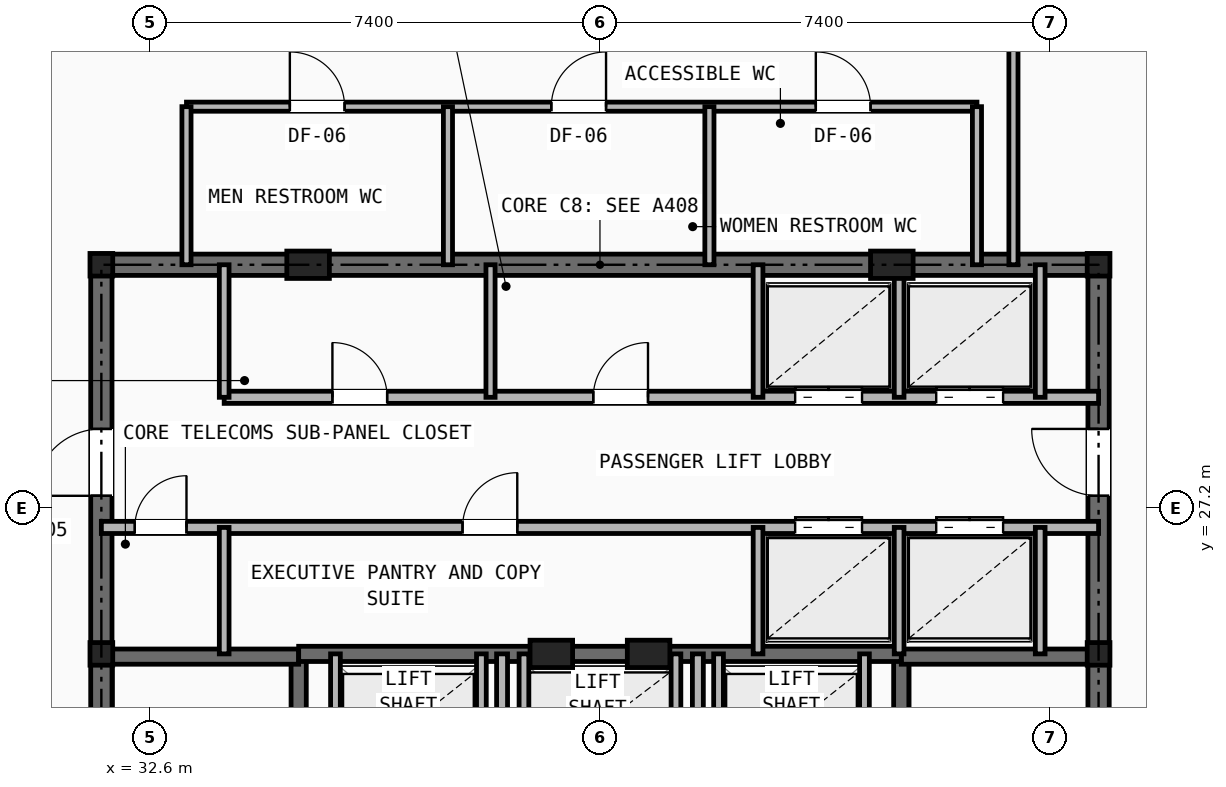
"""IFC4 building model, lengths in metres.
Left out: names, types, materials, properties, quantities, classifications, styles, units other than length and angle.
Written with IfcOpenShell. Run it as: python <this file> out.ifc"""

import sys

from ifc_helpers import new_model, si_unit, direction, frame, frame_2d, origin, origin_2d, place, context, subcontext, project, spatial, rectangle, i_section, extrude, element, fill, save


model = new_model("IFC4")
c1 = context("Model", 3, precision=1e-05, world=origin(), true_north=direction((0.0, 1.0)))
c2 = subcontext(c1, "Body", "Model", "MODEL_VIEW")
j1 = project(units=[si_unit("LENGTHUNIT", "METRE"), si_unit("PLANEANGLEUNIT", "RADIAN")], contexts=[c1])
p1 = place(None, origin())
s1 = spatial("IfcSite", under=j1, at=p1, CompositionType="ELEMENT")
p2 = place(p1, origin())
s2 = spatial("IfcBuilding", under=s1, at=p2, CompositionType="ELEMENT")
p3 = place(p2, frame((0.0, 0.0, 286.5)))
s3 = spatial("IfcBuildingStorey", under=s2, at=p3, CompositionType="ELEMENT", Elevation=286.5)
for number, where, z_axis, x_axis in (
    (1, (31.8, 24.8, 0.0), (0.0, 0.0, 1.0), (1.0, 0.0, 0.0)),
    (2, (48.2, 24.8, 0.0), (0.0, 0.0, 1.0), (1.0, 0.0, 0.0)),
    (3, (31.8, 31.2, 0.0), (0.0, 0.0, 1.0), (1.0, 0.0, 0.0)),
    (4, (48.2, 31.2, 0.0), (0.0, 0.0, 1.0), (1.0, 0.0, 0.0)),
):
    element("IfcColumn", number, at=place(p3, frame(where, z_axis=z_axis, x_axis=x_axis)), inside=s3, PredefinedType="COLUMN", context=c2, shape_type="SweptSolid", body=[
        extrude(i_section(OverallWidth=0.374, OverallDepth=0.372, WebThickness=0.016, FlangeThickness=0.026, at=origin_2d()), origin(), (0.0, 0.0, 1.0), 3.5),
    ])
for number, where, z_axis, x_axis in (
    (5, (35.2, 31.2, 0.0), (0.0, 0.0, 1.0), (1.0, 0.0, 0.0)),
    (6, (44.8, 31.2, 0.0), (0.0, 0.0, 1.0), (1.0, 0.0, 0.0)),
    (7, (39.2, 24.8, 0.0), (0.0, 0.0, 1.0), (1.0, 0.0, 0.0)),
    (8, (40.8, 24.8, 0.0), (0.0, 0.0, 1.0), (1.0, 0.0, 0.0)),
):
    element("IfcColumn", number, at=place(p3, frame(where, z_axis=z_axis, x_axis=x_axis)), inside=s3, PredefinedType="PILASTER", context=c2, shape_type="SweptSolid", body=[
        extrude(rectangle(XDim=0.7, YDim=0.45, at=origin_2d()), origin(), (0.0, 0.0, 1.0), 3.5),
    ])
p4 = place(p3, frame((31.8, 31.2, 0.0), z_axis=(0.0, 0.0, 1.0), x_axis=(1.0, 0.0, 0.0)))
e9 = element("IfcWall", 9, at=p4, inside=s3, PredefinedType="SHEAR", context=c2, shape_type="SweptSolid", body=[
    extrude(rectangle(XDim=16.4, YDim=0.35, at=frame_2d((8.2, 0.0))), origin(), (0.0, 0.0, 1.0), 3.2),
])
p5 = place(p3, frame((31.8, 16.4, 0.0), z_axis=(0.0, 0.0, 1.0), x_axis=(0.0, 1.0, 0.0)))
e10 = element("IfcWall", 10, at=p5, inside=s3, PredefinedType="SHEAR", context=c2, shape_type="SweptSolid", body=[
    extrude(rectangle(XDim=14.8, YDim=0.35, at=frame_2d((7.4, 0.0))), origin(), (0.0, 0.0, 1.0), 3.2),
])
p6 = place(p5, frame((11.0, 0.0, 0.0)))
e11 = element("IfcOpeningElement", 11, at=p6, cuts=e10, PredefinedType="OPENING", context=c2, shape_type="SweptSolid", body=[
    extrude(rectangle(XDim=1.1, YDim=2.15, at=frame_2d((0.55, 1.075))), frame((0.0, 0.185, 0.0), z_axis=(0.0, -1.0, 0.0), x_axis=(1.0, 0.0, 0.0)), (0.0, 0.0, 1.0), 0.37),
])
p7 = place(p3, frame((48.2, 16.4, 0.0), z_axis=(0.0, 0.0, 1.0), x_axis=(0.0, 1.0, 0.0)))
e12 = element("IfcWall", 12, at=p7, inside=s3, PredefinedType="SHEAR", context=c2, shape_type="SweptSolid", body=[
    extrude(rectangle(XDim=14.8, YDim=0.35, at=frame_2d((7.4, 0.0))), origin(), (0.0, 0.0, 1.0), 3.2),
])
p8 = place(p7, frame((11.0, 0.0, 0.0)))
e13 = element("IfcOpeningElement", 13, at=p8, cuts=e12, PredefinedType="OPENING", context=c2, shape_type="SweptSolid", body=[
    extrude(rectangle(XDim=1.1, YDim=2.15, at=frame_2d((0.55, 1.075))), frame((0.0, 0.185, 0.0), z_axis=(0.0, -1.0, 0.0), x_axis=(1.0, 0.0, 0.0)), (0.0, 0.0, 1.0), 0.37),
])
p9 = place(p3, frame((35.045, 16.4, 0.0), z_axis=(0.0, 0.0, 1.0), x_axis=(0.0, 1.0, 0.0)))
e14 = element("IfcWall", 14, at=p9, inside=s3, PredefinedType="SHEAR", context=c2, shape_type="SweptSolid", body=[
    extrude(rectangle(XDim=8.4, YDim=0.25, at=frame_2d((4.2, 0.0))), origin(), (0.0, 0.0, 1.0), 3.2),
])
p10 = place(p9, frame((0.45, 0.0, 0.0)))
e15 = element("IfcOpeningElement", 15, at=p10, cuts=e14, PredefinedType="OPENING", context=c2, shape_type="SweptSolid", body=[
    extrude(rectangle(XDim=0.95, YDim=2.1, at=frame_2d((0.475, 1.05))), frame((0.0, 0.135, 0.0), z_axis=(0.0, -1.0, 0.0), x_axis=(1.0, 0.0, 0.0)), (0.0, 0.0, 1.0), 0.27),
])
p11 = place(p3, frame((31.8, 24.755, 0.0), z_axis=(0.0, 0.0, 1.0), x_axis=(1.0, 0.0, 0.0)))
e16 = element("IfcWall", 16, at=p11, inside=s3, PredefinedType="SHEAR", context=c2, shape_type="SweptSolid", body=[
    extrude(rectangle(XDim=3.245, YDim=0.25, at=frame_2d((1.623, 0.0))), origin(), (0.0, 0.0, 1.0), 3.2),
])
p12 = place(p3, frame((44.955, 16.4, 0.0), z_axis=(0.0, 0.0, 1.0), x_axis=(0.0, 1.0, 0.0)))
e17 = element("IfcWall", 17, at=p12, inside=s3, PredefinedType="SHEAR", context=c2, shape_type="SweptSolid", body=[
    extrude(rectangle(XDim=8.4, YDim=0.25, at=frame_2d((4.2, 0.0))), origin(), (0.0, 0.0, 1.0), 3.2),
])
p13 = place(p12, frame((0.45, 0.0, 0.0)))
e18 = element("IfcOpeningElement", 18, at=p13, cuts=e17, PredefinedType="OPENING", context=c2, shape_type="SweptSolid", body=[
    extrude(rectangle(XDim=0.95, YDim=2.1, at=frame_2d((0.475, 1.05))), frame((0.0, 0.135, 0.0), z_axis=(0.0, -1.0, 0.0), x_axis=(1.0, 0.0, 0.0)), (0.0, 0.0, 1.0), 0.27),
])
p14 = place(p3, frame((44.955, 24.755, 0.0), z_axis=(0.0, 0.0, 1.0), x_axis=(1.0, 0.0, 0.0)))
e19 = element("IfcWall", 19, at=p14, inside=s3, PredefinedType="SHEAR", context=c2, shape_type="SweptSolid", body=[
    extrude(rectangle(XDim=3.245, YDim=0.25, at=frame_2d((1.623, 0.0))), origin(), (0.0, 0.0, 1.0), 3.2),
])
p15 = place(p3, frame((35.045, 24.8, 0.0), z_axis=(0.0, 0.0, 1.0), x_axis=(1.0, 0.0, 0.0)))
e20 = element("IfcWall", 20, at=p15, inside=s3, PredefinedType="SHEAR", context=c2, shape_type="SweptSolid", body=[
    extrude(rectangle(XDim=9.91, YDim=0.25, at=frame_2d((4.955, 0.0))), origin(), (0.0, 0.0, 1.0), 3.2),
])
p16 = place(p3, frame((38.39, 16.4, 0.0), z_axis=(0.0, 0.0, 1.0), x_axis=(0.0, 1.0, 0.0)))
e21 = element("IfcWall", 21, at=p16, inside=s3, PredefinedType="PARTITIONING", context=c2, shape_type="SweptSolid", body=[
    extrude(rectangle(XDim=8.4, YDim=0.18, at=frame_2d((4.2, 0.0))), origin(), (0.0, 0.0, 1.0), 2.655),
])
p17 = place(p16, frame((3.85, 0.0, 0.0)))
e22 = element("IfcOpeningElement", 22, at=p17, cuts=e21, PredefinedType="OPENING", context=c2, shape_type="SweptSolid", body=[
    extrude(rectangle(XDim=0.95, YDim=2.1, at=frame_2d((0.475, 1.05))), frame((0.0, 0.1, 0.0), z_axis=(0.0, -1.0, 0.0), x_axis=(1.0, 0.0, 0.0)), (0.0, 0.0, 1.0), 0.2),
])
p18 = place(p3, frame((41.61, 16.4, 0.0), z_axis=(0.0, 0.0, 1.0), x_axis=(0.0, 1.0, 0.0)))
e23 = element("IfcWall", 23, at=p18, inside=s3, PredefinedType="PARTITIONING", context=c2, shape_type="SweptSolid", body=[
    extrude(rectangle(XDim=8.4, YDim=0.18, at=frame_2d((4.2, 0.0))), origin(), (0.0, 0.0, 1.0), 2.655),
])
for number, where, z_axis, x_axis in (
    (24, (35.65, 22.48, 0.0), (0.0, 0.0, 1.0), (0.0, 1.0, 0.0)),
    (25, (38.05, 22.48, 0.0), (0.0, 0.0, 1.0), (0.0, 1.0, 0.0)),
    (26, (41.95, 22.48, 0.0), (0.0, 0.0, 1.0), (0.0, 1.0, 0.0)),
    (27, (44.35, 22.48, 0.0), (0.0, 0.0, 1.0), (0.0, 1.0, 0.0)),
    (28, (38.75, 22.48, 0.0), (0.0, 0.0, 1.0), (0.0, 1.0, 0.0)),
    (29, (41.25, 22.48, 0.0), (0.0, 0.0, 1.0), (0.0, 1.0, 0.0)),
):
    element("IfcWall", number, at=place(p3, frame(where, z_axis=z_axis, x_axis=x_axis)), inside=s3, PredefinedType="SOLIDWALL", context=c2, shape_type="SweptSolid", body=[
        extrude(rectangle(XDim=2.32, YDim=0.16, at=frame_2d((1.16, 0.0))), origin(), (0.0, 0.0, 1.0), 3.2),
    ])
p19 = place(p3, frame((33.82, 29.02, 0.0), z_axis=(0.0, 0.0, 1.0), x_axis=(1.0, 0.0, 0.0)))
e30 = element("IfcWall", 30, at=p19, inside=s3, PredefinedType="SOLIDWALL", context=c2, shape_type="SweptSolid", body=[
    extrude(rectangle(XDim=14.38, YDim=0.2, at=frame_2d((7.19, 0.0))), origin(), (0.0, 0.0, 1.0), 2.655),
])
p20 = place(p19, frame((1.78, 0.0, 0.0)))
e31 = element("IfcOpeningElement", 31, at=p20, cuts=e30, PredefinedType="OPENING", context=c2, shape_type="SweptSolid", body=[
    extrude(rectangle(XDim=0.9, YDim=2.1, at=frame_2d((0.45, 1.05))), frame((0.0, 0.11, 0.0), z_axis=(0.0, -1.0, 0.0), x_axis=(1.0, 0.0, 0.0)), (0.0, 0.0, 1.0), 0.22),
])
p21 = place(p19, frame((6.07, 0.0, 0.0)))
e32 = element("IfcOpeningElement", 32, at=p21, cuts=e30, PredefinedType="OPENING", context=c2, shape_type="SweptSolid", body=[
    extrude(rectangle(XDim=0.9, YDim=2.1, at=frame_2d((0.45, 1.05))), frame((0.0, 0.11, 0.0), z_axis=(0.0, -1.0, 0.0), x_axis=(1.0, 0.0, 0.0)), (0.0, 0.0, 1.0), 0.22),
])
p22 = place(p19, frame((9.39, 0.0, 0.0)))
e33 = element("IfcOpeningElement", 33, at=p22, cuts=e30, PredefinedType="OPENING", context=c2, shape_type="SweptSolid", body=[
    extrude(rectangle(XDim=1.1, YDim=2.15, at=frame_2d((0.55, 1.075))), frame((0.0, 0.11, 0.0), z_axis=(0.0, -1.0, 0.0), x_axis=(1.0, 0.0, 0.0)), (0.0, 0.0, 1.0), 0.22),
])
p23 = place(p19, frame((11.71, 0.0, 0.0)))
e34 = element("IfcOpeningElement", 34, at=p23, cuts=e30, PredefinedType="OPENING", context=c2, shape_type="SweptSolid", body=[
    extrude(rectangle(XDim=1.1, YDim=2.15, at=frame_2d((0.55, 1.075))), frame((0.0, 0.11, 0.0), z_axis=(0.0, -1.0, 0.0), x_axis=(1.0, 0.0, 0.0)), (0.0, 0.0, 1.0), 0.22),
])
p24 = place(p3, frame((31.8, 26.88, 0.0), z_axis=(0.0, 0.0, 1.0), x_axis=(1.0, 0.0, 0.0)))
e35 = element("IfcWall", 35, at=p24, inside=s3, PredefinedType="SOLIDWALL", context=c2, shape_type="SweptSolid", body=[
    extrude(rectangle(XDim=16.4, YDim=0.2, at=frame_2d((8.2, 0.0))), origin(), (0.0, 0.0, 1.0), 2.655),
])
p25 = place(p24, frame((0.55, 0.0, 0.0)))
e36 = element("IfcOpeningElement", 36, at=p25, cuts=e35, PredefinedType="OPENING", context=c2, shape_type="SweptSolid", body=[
    extrude(rectangle(XDim=0.85, YDim=2.05, at=frame_2d((0.425, 1.025))), frame((0.0, 0.11, 0.0), z_axis=(0.0, -1.0, 0.0), x_axis=(1.0, 0.0, 0.0)), (0.0, 0.0, 1.0), 0.22),
])
p26 = place(p24, frame((5.94, 0.0, 0.0)))
e37 = element("IfcOpeningElement", 37, at=p26, cuts=e35, PredefinedType="OPENING", context=c2, shape_type="SweptSolid", body=[
    extrude(rectangle(XDim=0.9, YDim=2.1, at=frame_2d((0.45, 1.05))), frame((0.0, 0.11, 0.0), z_axis=(0.0, -1.0, 0.0), x_axis=(1.0, 0.0, 0.0)), (0.0, 0.0, 1.0), 0.22),
])
p27 = place(p24, frame((11.41, 0.0, 0.0)))
e38 = element("IfcOpeningElement", 38, at=p27, cuts=e35, PredefinedType="OPENING", context=c2, shape_type="SweptSolid", body=[
    extrude(rectangle(XDim=1.1, YDim=2.15, at=frame_2d((0.55, 1.075))), frame((0.0, 0.11, 0.0), z_axis=(0.0, -1.0, 0.0), x_axis=(1.0, 0.0, 0.0)), (0.0, 0.0, 1.0), 0.22),
])
p28 = place(p24, frame((13.73, 0.0, 0.0)))
e39 = element("IfcOpeningElement", 39, at=p28, cuts=e35, PredefinedType="OPENING", context=c2, shape_type="SweptSolid", body=[
    extrude(rectangle(XDim=1.1, YDim=2.15, at=frame_2d((0.55, 1.075))), frame((0.0, 0.11, 0.0), z_axis=(0.0, -1.0, 0.0), x_axis=(1.0, 0.0, 0.0)), (0.0, 0.0, 1.0), 0.22),
])
p29 = place(p3, frame((33.82, 29.02, 0.0), z_axis=(0.0, 0.0, 1.0), x_axis=(0.0, 1.0, 0.0)))
e40 = element("IfcWall", 40, at=p29, inside=s3, PredefinedType="SOLIDWALL", context=c2, shape_type="SweptSolid", body=[
    extrude(rectangle(XDim=2.18, YDim=0.16, at=frame_2d((1.09, 0.0))), origin(), (0.0, 0.0, 1.0), 2.655),
])
p30 = place(p3, frame((33.82, 24.8, 0.0), z_axis=(0.0, 0.0, 1.0), x_axis=(0.0, 1.0, 0.0)))
e41 = element("IfcWall", 41, at=p30, inside=s3, PredefinedType="SOLIDWALL", context=c2, shape_type="SweptSolid", body=[
    extrude(rectangle(XDim=2.08, YDim=0.16, at=frame_2d((1.04, 0.0))), origin(), (0.0, 0.0, 1.0), 3.2),
])
p31 = place(p3, frame((38.2, 29.02, 0.0), z_axis=(0.0, 0.0, 1.0), x_axis=(0.0, 1.0, 0.0)))
e42 = element("IfcWall", 42, at=p31, inside=s3, PredefinedType="PARTITIONING", context=c2, shape_type="SweptSolid", body=[
    extrude(rectangle(XDim=2.18, YDim=0.15, at=frame_2d((1.09, 0.0))), origin(), (0.0, 0.0, 1.0), 2.655),
])
for number, where, z_axis, x_axis in (
    (43, (42.6, 29.02, 0.0), (0.0, 0.0, 1.0), (0.0, 1.0, 0.0)),
    (44, (44.92, 29.02, 0.0), (0.0, 0.0, 1.0), (0.0, 1.0, 0.0)),
    (45, (47.24, 29.02, 0.0), (0.0, 0.0, 1.0), (0.0, 1.0, 0.0)),
):
    element("IfcWall", number, at=place(p3, frame(where, z_axis=z_axis, x_axis=x_axis)), inside=s3, PredefinedType="SOLIDWALL", context=c2, shape_type="SweptSolid", body=[
        extrude(rectangle(XDim=2.18, YDim=0.16, at=frame_2d((1.09, 0.0))), origin(), (0.0, 0.0, 1.0), 2.655),
    ])
for number, where, z_axis, x_axis in (
    (46, (42.6, 24.8, 0.0), (0.0, 0.0, 1.0), (0.0, 1.0, 0.0)),
    (47, (44.92, 24.8, 0.0), (0.0, 0.0, 1.0), (0.0, 1.0, 0.0)),
    (48, (47.24, 24.8, 0.0), (0.0, 0.0, 1.0), (0.0, 1.0, 0.0)),
):
    element("IfcWall", number, at=place(p3, frame(where, z_axis=z_axis, x_axis=x_axis)), inside=s3, PredefinedType="SOLIDWALL", context=c2, shape_type="SweptSolid", body=[
        extrude(rectangle(XDim=2.08, YDim=0.16, at=frame_2d((1.04, 0.0))), origin(), (0.0, 0.0, 1.0), 3.2),
    ])
p32 = place(p3, frame((33.2, 33.8, 0.0), z_axis=(0.0, 0.0, 1.0), x_axis=(1.0, 0.0, 0.0)))
e49 = element("IfcWall", 49, at=p32, inside=s3, PredefinedType="PARTITIONING", context=c2, shape_type="SweptSolid", body=[
    extrude(rectangle(XDim=13.0, YDim=0.15, at=frame_2d((6.5, 0.0))), origin(), (0.0, 0.0, 1.0), 3.2),
])
p33 = place(p32, frame((1.7, 0.0, 0.0)))
e50 = element("IfcOpeningElement", 50, at=p33, cuts=e49, PredefinedType="OPENING", context=c2, shape_type="SweptSolid", body=[
    extrude(rectangle(XDim=0.9, YDim=2.1, at=frame_2d((0.45, 1.05))), frame((0.0, 0.085, 0.0), z_axis=(0.0, -1.0, 0.0), x_axis=(1.0, 0.0, 0.0)), (0.0, 0.0, 1.0), 0.17),
])
p34 = place(p32, frame((6.0, 0.0, 0.0)))
e51 = element("IfcOpeningElement", 51, at=p34, cuts=e49, PredefinedType="OPENING", context=c2, shape_type="SweptSolid", body=[
    extrude(rectangle(XDim=0.9, YDim=2.1, at=frame_2d((0.45, 1.05))), frame((0.0, 0.085, 0.0), z_axis=(0.0, -1.0, 0.0), x_axis=(1.0, 0.0, 0.0)), (0.0, 0.0, 1.0), 0.17),
])
p35 = place(p32, frame((10.35, 0.0, 0.0)))
e52 = element("IfcOpeningElement", 52, at=p35, cuts=e49, PredefinedType="OPENING", context=c2, shape_type="SweptSolid", body=[
    extrude(rectangle(XDim=0.9, YDim=2.1, at=frame_2d((0.45, 1.05))), frame((0.0, 0.085, 0.0), z_axis=(0.0, -1.0, 0.0), x_axis=(1.0, 0.0, 0.0)), (0.0, 0.0, 1.0), 0.17),
])
for number, where, z_axis, x_axis in (
    (53, (33.2, 31.2, 0.0), (0.0, 0.0, 1.0), (0.0, 1.0, 0.0)),
    (54, (46.2, 31.2, 0.0), (0.0, 0.0, 1.0), (0.0, 1.0, 0.0)),
    (55, (37.5, 31.2, 0.0), (0.0, 0.0, 1.0), (0.0, 1.0, 0.0)),
    (56, (41.8, 31.2, 0.0), (0.0, 0.0, 1.0), (0.0, 1.0, 0.0)),
):
    element("IfcWall", number, at=place(p3, frame(where, z_axis=z_axis, x_axis=x_axis)), inside=s3, PredefinedType="PARTITIONING", context=c2, shape_type="SweptSolid", body=[
        extrude(rectangle(XDim=2.6, YDim=0.15, at=frame_2d((1.3, 0.0))), origin(), (0.0, 0.0, 1.0), 2.655),
    ])
p36 = place(p3, frame((46.8, 31.2, 0.0), z_axis=(0.0, 0.0, 1.0), x_axis=(0.0, 1.0, 0.0)))
e57 = element("IfcWall", 57, at=p36, inside=s3, PredefinedType="PARTITIONING", context=c2, shape_type="SweptSolid", body=[
    extrude(rectangle(XDim=4.5, YDim=0.15, at=frame_2d((2.25, 0.0))), origin(), (0.0, 0.0, 1.0), 2.655),
])
p37 = place(p25, origin())
e58 = element("IfcDoor", 58, at=p37, inside=s3, OperationType="SINGLE_SWING_RIGHT", PredefinedType="DOOR", context=c2, shape_type="SweptSolid", body=[
    extrude(rectangle(XDim=0.85, YDim=2.05, at=frame_2d((0.425, 1.025))), frame((0.0, 0.025, 0.0), z_axis=(0.0, -1.0, 0.0), x_axis=(1.0, 0.0, 0.0)), (0.0, 0.0, 1.0), 0.05),
])
fill(e36, e58)
p38 = place(p6, origin())
e59 = element("IfcDoor", 59, at=p38, inside=s3, OperationType="SINGLE_SWING_LEFT", PredefinedType="DOOR", context=c2, shape_type="SweptSolid", body=[
    extrude(rectangle(XDim=1.1, YDim=2.15, at=frame_2d((0.55, 1.075))), frame((0.0, 0.025, 0.0), z_axis=(0.0, -1.0, 0.0), x_axis=(1.0, 0.0, 0.0)), (0.0, 0.0, 1.0), 0.05),
])
fill(e11, e59)
p39 = place(p8, origin())
e60 = element("IfcDoor", 60, at=p39, inside=s3, OperationType="SINGLE_SWING_RIGHT", PredefinedType="DOOR", context=c2, shape_type="SweptSolid", body=[
    extrude(rectangle(XDim=1.1, YDim=2.15, at=frame_2d((0.55, 1.075))), frame((0.0, 0.025, 0.0), z_axis=(0.0, -1.0, 0.0), x_axis=(1.0, 0.0, 0.0)), (0.0, 0.0, 1.0), 0.05),
])
fill(e13, e60)
p40 = place(p20, origin())
e61 = element("IfcDoor", 61, at=p40, inside=s3, OperationType="SINGLE_SWING_LEFT", PredefinedType="DOOR", context=c2, shape_type="SweptSolid", body=[
    extrude(rectangle(XDim=0.9, YDim=2.1, at=frame_2d((0.45, 1.05))), frame((0.0, 0.025, 0.0), z_axis=(0.0, -1.0, 0.0), x_axis=(1.0, 0.0, 0.0)), (0.0, 0.0, 1.0), 0.05),
])
fill(e31, e61)
p41 = place(p21, origin())
e62 = element("IfcDoor", 62, at=p41, inside=s3, OperationType="SINGLE_SWING_RIGHT", PredefinedType="DOOR", context=c2, shape_type="SweptSolid", body=[
    extrude(rectangle(XDim=0.9, YDim=2.1, at=frame_2d((0.45, 1.05))), frame((0.0, 0.025, 0.0), z_axis=(0.0, -1.0, 0.0), x_axis=(1.0, 0.0, 0.0)), (0.0, 0.0, 1.0), 0.05),
])
fill(e32, e62)
p42 = place(p26, origin())
e63 = element("IfcDoor", 63, at=p42, inside=s3, OperationType="SINGLE_SWING_RIGHT", PredefinedType="DOOR", context=c2, shape_type="SweptSolid", body=[
    extrude(rectangle(XDim=0.9, YDim=2.1, at=frame_2d((0.45, 1.05))), frame((0.0, 0.025, 0.0), z_axis=(0.0, -1.0, 0.0), x_axis=(1.0, 0.0, 0.0)), (0.0, 0.0, 1.0), 0.05),
])
fill(e37, e63)
p43 = place(p22, origin())
e64 = element("IfcDoor", 64, at=p43, inside=s3, OperationType="DOUBLE_DOOR_SLIDING", PredefinedType="DOOR", context=c2, shape_type="SweptSolid", body=[
    extrude(rectangle(XDim=1.1, YDim=2.15, at=frame_2d((0.55, 1.075))), frame((0.0, 0.025, 0.0), z_axis=(0.0, -1.0, 0.0), x_axis=(1.0, 0.0, 0.0)), (0.0, 0.0, 1.0), 0.05),
])
fill(e33, e64)
p44 = place(p23, origin())
e65 = element("IfcDoor", 65, at=p44, inside=s3, OperationType="DOUBLE_DOOR_SLIDING", PredefinedType="DOOR", context=c2, shape_type="SweptSolid", body=[
    extrude(rectangle(XDim=1.1, YDim=2.15, at=frame_2d((0.55, 1.075))), frame((0.0, 0.025, 0.0), z_axis=(0.0, -1.0, 0.0), x_axis=(1.0, 0.0, 0.0)), (0.0, 0.0, 1.0), 0.05),
])
fill(e34, e65)
p45 = place(p27, origin())
e66 = element("IfcDoor", 66, at=p45, inside=s3, OperationType="DOUBLE_DOOR_SLIDING", PredefinedType="DOOR", context=c2, shape_type="SweptSolid", body=[
    extrude(rectangle(XDim=1.1, YDim=2.15, at=frame_2d((0.55, 1.075))), frame((0.0, 0.025, 0.0), z_axis=(0.0, -1.0, 0.0), x_axis=(1.0, 0.0, 0.0)), (0.0, 0.0, 1.0), 0.05),
])
fill(e38, e66)
p46 = place(p28, origin())
e67 = element("IfcDoor", 67, at=p46, inside=s3, OperationType="DOUBLE_DOOR_SLIDING", PredefinedType="DOOR", context=c2, shape_type="SweptSolid", body=[
    extrude(rectangle(XDim=1.1, YDim=2.15, at=frame_2d((0.55, 1.075))), frame((0.0, 0.025, 0.0), z_axis=(0.0, -1.0, 0.0), x_axis=(1.0, 0.0, 0.0)), (0.0, 0.0, 1.0), 0.05),
])
fill(e39, e67)
p47 = place(p33, origin())
e68 = element("IfcDoor", 68, at=p47, inside=s3, OperationType="SINGLE_SWING_LEFT", PredefinedType="DOOR", context=c2, shape_type="SweptSolid", body=[
    extrude(rectangle(XDim=0.9, YDim=2.1, at=frame_2d((0.45, 1.05))), frame((0.0, 0.025, 0.0), z_axis=(0.0, -1.0, 0.0), x_axis=(1.0, 0.0, 0.0)), (0.0, 0.0, 1.0), 0.05),
])
fill(e50, e68)
p48 = place(p34, origin())
e69 = element("IfcDoor", 69, at=p48, inside=s3, OperationType="SINGLE_SWING_RIGHT", PredefinedType="DOOR", context=c2, shape_type="SweptSolid", body=[
    extrude(rectangle(XDim=0.9, YDim=2.1, at=frame_2d((0.45, 1.05))), frame((0.0, 0.025, 0.0), z_axis=(0.0, -1.0, 0.0), x_axis=(1.0, 0.0, 0.0)), (0.0, 0.0, 1.0), 0.05),
])
fill(e51, e69)
p49 = place(p35, origin())
e70 = element("IfcDoor", 70, at=p49, inside=s3, OperationType="SINGLE_SWING_LEFT", PredefinedType="DOOR", context=c2, shape_type="SweptSolid", body=[
    extrude(rectangle(XDim=0.9, YDim=2.1, at=frame_2d((0.45, 1.05))), frame((0.0, 0.025, 0.0), z_axis=(0.0, -1.0, 0.0), x_axis=(1.0, 0.0, 0.0)), (0.0, 0.0, 1.0), 0.05),
])
fill(e52, e70)
save(model, sys.argv[1])
